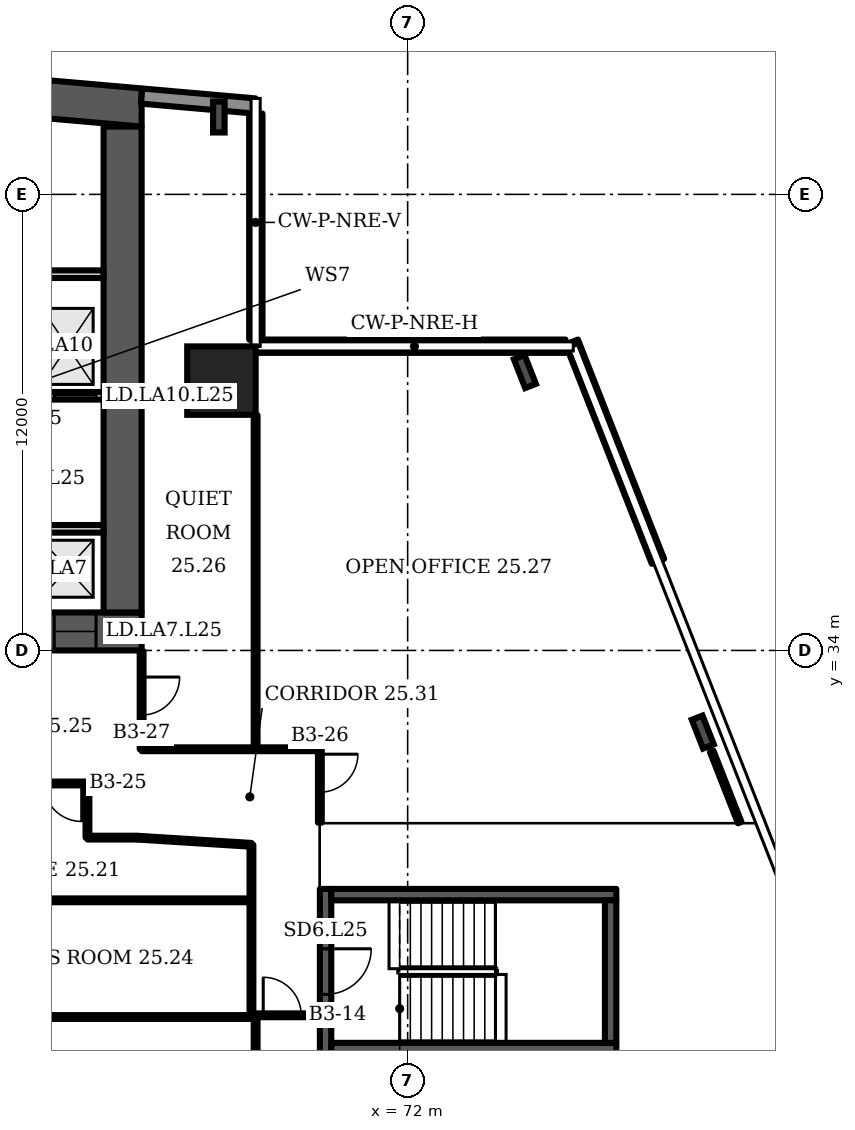
"""IFC4 building model, lengths in metres.
Left out: names, types, materials, properties, quantities, classifications, styles, units other than length and angle.
Written with IfcOpenShell. Run it as: python <this file> out.ifc"""

import sys

from ifc_helpers import new_model, si_unit, direction, frame, frame_2d, origin, origin_2d, place, context, subcontext, project, spatial, polyline, rectangle, i_section, outline, extrude, element, fill, save


model = new_model("IFC4")
c1 = context("Model", 3, precision=1e-05, world=origin(), true_north=direction((0.0, 1.0)))
c2 = subcontext(c1, "Body", "Model", "MODEL_VIEW")
j1 = project(units=[si_unit("LENGTHUNIT", "METRE"), si_unit("PLANEANGLEUNIT", "RADIAN")], contexts=[c1])
p1 = place(None, origin())
s1 = spatial("IfcSite", under=j1, at=p1, CompositionType="ELEMENT")
p2 = place(p1, origin())
s2 = spatial("IfcBuilding", under=s1, at=p2, CompositionType="ELEMENT")
p3 = place(p2, frame((0.0, 0.0, 111.1)))
s3 = spatial("IfcBuildingStorey", under=s2, at=p3, CompositionType="ELEMENT", Elevation=111.1)
p4 = place(p3, frame((0.0, 0.0, -0.0)))
e1 = element("IfcWall", 1, at=p4, inside=s3, PredefinedType="SHEAR", context=c2, shape_type="SweptSolid", body=[
    extrude(outline(polyline([(16.0, 47.784), (40.5, 49.927), (65.0, 47.784), (65.0, 48.787), (40.5, 50.931), (16.0, 48.787), (16.0, 47.784)])), origin(), (0.0, 0.0, 1.0), 3.6),
])
p5 = place(p3, frame((16.0, 34.5, 0.0), z_axis=(0.0, 0.0, 1.0), x_axis=(1.0, 0.0, 0.0)))
e2 = element("IfcWall", 2, at=p5, inside=s3, PredefinedType="SHEAR", context=c2, shape_type="SweptSolid", body=[
    extrude(rectangle(XDim=49.0, YDim=1.0, at=frame_2d((24.5, 0.0))), origin(), (0.0, 0.0, 1.0), 3.6),
])
p6 = place(p5, frame((1.2, 0.0, 0.0)))
e3 = element("IfcOpeningElement", 3, at=p6, cuts=e2, PredefinedType="OPENING", context=c2, shape_type="SweptSolid", body=[
    extrude(rectangle(XDim=1.1, YDim=2.1, at=frame_2d((0.55, 1.05))), frame((0.0, 0.51, 0.0), z_axis=(0.0, -1.0, 0.0), x_axis=(1.0, 0.0, 0.0)), (0.0, 0.0, 1.0), 1.02),
])
p7 = place(p5, frame((5.083, 0.0, 0.0)))
e4 = element("IfcOpeningElement", 4, at=p7, cuts=e2, PredefinedType="OPENING", context=c2, shape_type="SweptSolid", body=[
    extrude(rectangle(XDim=1.1, YDim=2.1, at=frame_2d((0.55, 1.05))), frame((0.0, 0.51, 0.0), z_axis=(0.0, -1.0, 0.0), x_axis=(1.0, 0.0, 0.0)), (0.0, 0.0, 1.0), 1.02),
])
p8 = place(p5, frame((2.933, 0.0, 0.0)))
e5 = element("IfcOpeningElement", 5, at=p8, cuts=e2, PredefinedType="OPENING", context=c2, shape_type="SweptSolid", body=[
    extrude(rectangle(XDim=1.4, YDim=2.1, at=frame_2d((0.7, 1.05))), frame((0.0, 0.51, 0.0), z_axis=(0.0, -1.0, 0.0), x_axis=(1.0, 0.0, 0.0)), (0.0, 0.0, 1.0), 1.02),
])
p9 = place(p5, frame((7.65, 0.0, 0.0)))
e6 = element("IfcOpeningElement", 6, at=p9, cuts=e2, PredefinedType="OPENING", context=c2, shape_type="SweptSolid", body=[
    extrude(rectangle(XDim=1.2, YDim=2.1, at=frame_2d((0.6, 1.05))), frame((0.0, 0.51, 0.0), z_axis=(0.0, -1.0, 0.0), x_axis=(1.0, 0.0, 0.0)), (0.0, 0.0, 1.0), 1.02),
])
p10 = place(p5, frame((14.817, 0.0, 0.0)))
e7 = element("IfcOpeningElement", 7, at=p10, cuts=e2, PredefinedType="OPENING", context=c2, shape_type="SweptSolid", body=[
    extrude(rectangle(XDim=1.1, YDim=2.1, at=frame_2d((0.55, 1.05))), frame((0.0, 0.51, 0.0), z_axis=(0.0, -1.0, 0.0), x_axis=(1.0, 0.0, 0.0)), (0.0, 0.0, 1.0), 1.02),
])
p11 = place(p5, frame((19.083, 0.0, 0.0)))
e8 = element("IfcOpeningElement", 8, at=p11, cuts=e2, PredefinedType="OPENING", context=c2, shape_type="SweptSolid", body=[
    extrude(rectangle(XDim=1.1, YDim=2.1, at=frame_2d((0.55, 1.05))), frame((0.0, 0.51, 0.0), z_axis=(0.0, -1.0, 0.0), x_axis=(1.0, 0.0, 0.0)), (0.0, 0.0, 1.0), 1.02),
])
p12 = place(p5, frame((16.8, 0.0, 0.0)))
e9 = element("IfcOpeningElement", 9, at=p12, cuts=e2, PredefinedType="OPENING", context=c2, shape_type="SweptSolid", body=[
    extrude(rectangle(XDim=1.4, YDim=2.1, at=frame_2d((0.7, 1.05))), frame((0.0, 0.51, 0.0), z_axis=(0.0, -1.0, 0.0), x_axis=(1.0, 0.0, 0.0)), (0.0, 0.0, 1.0), 1.02),
])
p13 = place(p5, frame((21.817, 0.0, 0.0)))
e10 = element("IfcOpeningElement", 10, at=p13, cuts=e2, PredefinedType="OPENING", context=c2, shape_type="SweptSolid", body=[
    extrude(rectangle(XDim=1.1, YDim=2.1, at=frame_2d((0.55, 1.05))), frame((0.0, 0.51, 0.0), z_axis=(0.0, -1.0, 0.0), x_axis=(1.0, 0.0, 0.0)), (0.0, 0.0, 1.0), 1.02),
])
p14 = place(p5, frame((26.083, 0.0, 0.0)))
e11 = element("IfcOpeningElement", 11, at=p14, cuts=e2, PredefinedType="OPENING", context=c2, shape_type="SweptSolid", body=[
    extrude(rectangle(XDim=1.1, YDim=2.1, at=frame_2d((0.55, 1.05))), frame((0.0, 0.51, 0.0), z_axis=(0.0, -1.0, 0.0), x_axis=(1.0, 0.0, 0.0)), (0.0, 0.0, 1.0), 1.02),
])
p15 = place(p5, frame((33.15, 0.0, 0.0)))
e12 = element("IfcOpeningElement", 12, at=p15, cuts=e2, PredefinedType="OPENING", context=c2, shape_type="SweptSolid", body=[
    extrude(rectangle(XDim=1.2, YDim=2.1, at=frame_2d((0.6, 1.05))), frame((0.0, 0.51, 0.0), z_axis=(0.0, -1.0, 0.0), x_axis=(1.0, 0.0, 0.0)), (0.0, 0.0, 1.0), 1.02),
])
p16 = place(p5, frame((37.8, 0.0, 0.0)))
e13 = element("IfcOpeningElement", 13, at=p16, cuts=e2, PredefinedType="OPENING", context=c2, shape_type="SweptSolid", body=[
    extrude(rectangle(XDim=1.4, YDim=2.1, at=frame_2d((0.7, 1.05))), frame((0.0, 0.51, 0.0), z_axis=(0.0, -1.0, 0.0), x_axis=(1.0, 0.0, 0.0)), (0.0, 0.0, 1.0), 1.02),
])
p17 = place(p5, frame((42.817, 0.0, 0.0)))
e14 = element("IfcOpeningElement", 14, at=p17, cuts=e2, PredefinedType="OPENING", context=c2, shape_type="SweptSolid", body=[
    extrude(rectangle(XDim=1.1, YDim=2.1, at=frame_2d((0.55, 1.05))), frame((0.0, 0.51, 0.0), z_axis=(0.0, -1.0, 0.0), x_axis=(1.0, 0.0, 0.0)), (0.0, 0.0, 1.0), 1.02),
])
p18 = place(p5, frame((46.7, 0.0, 0.0)))
e15 = element("IfcOpeningElement", 15, at=p18, cuts=e2, PredefinedType="OPENING", context=c2, shape_type="SweptSolid", body=[
    extrude(rectangle(XDim=1.1, YDim=2.1, at=frame_2d((0.55, 1.05))), frame((0.0, 0.51, 0.0), z_axis=(0.0, -1.0, 0.0), x_axis=(1.0, 0.0, 0.0)), (0.0, 0.0, 1.0), 1.02),
])
p19 = place(p5, frame((44.667, 0.0, 0.0)))
e16 = element("IfcOpeningElement", 16, at=p19, cuts=e2, PredefinedType="OPENING", context=c2, shape_type="SweptSolid", body=[
    extrude(rectangle(XDim=1.4, YDim=2.1, at=frame_2d((0.7, 1.05))), frame((0.0, 0.51, 0.0), z_axis=(0.0, -1.0, 0.0), x_axis=(1.0, 0.0, 0.0)), (0.0, 0.0, 1.0), 1.02),
])
p20 = place(p3, frame((64.5, 35.0, 0.0), z_axis=(0.0, 0.0, 1.0), x_axis=(0.0, 1.0, 0.0)))
e17 = element("IfcWall", 17, at=p20, inside=s3, PredefinedType="SHEAR", context=c2, shape_type="SweptSolid", body=[
    extrude(rectangle(XDim=12.784, YDim=1.0, at=frame_2d((6.392, 0.0))), origin(), (0.0, 0.0, 1.0), 3.6),
])
p21 = place(p3, frame((67.1, 41.1, 0.0), z_axis=(0.0, 0.0, 1.0), x_axis=(1.0, 0.0, 0.0)))
e18 = element("IfcColumn", 18, at=p21, inside=s3, PredefinedType="COLUMN", context=c2, shape_type="SweptSolid", body=[
    extrude(rectangle(XDim=1.8, YDim=1.8, at=origin_2d()), origin(), (0.0, 0.0, 1.0), 3.6),
])
for number, where, z_axis, x_axis in (
    (19, (79.766, 31.853, 0.0), (0.0, 0.0, 1.0), (0.931, 0.366, 0.0)),
    (20, (75.085, 41.338, 0.0), (0.0, 0.0, 1.0), (0.931, 0.366, 0.0)),
    (21, (67.032, 48.036, 0.0), (0.0, 0.0, 1.0), (1.0, 0.0, 0.0)),
):
    element("IfcColumn", number, at=place(p3, frame(where, z_axis=z_axis, x_axis=x_axis)), inside=s3, PredefinedType="COLUMN", context=c2, shape_type="SweptSolid", body=[
        extrude(i_section(OverallWidth=0.303, OverallDepth=0.814, WebThickness=0.021, FlangeThickness=0.04, FilletRadius=0.03, at=origin_2d()), origin(), (0.0, 0.0, 1.0), 3.6),
    ])
p22 = place(p3, frame((67.983, 48.326, 0.0), z_axis=(0.0, 0.0, 1.0), x_axis=(-0.996194, 0.087168, 0.0)))
e22 = element("IfcWall", 22, at=p22, inside=s3, PredefinedType="SOLIDWALL", context=c2, shape_type="SweptSolid", body=[
    extrude(rectangle(XDim=2.994, YDim=0.4, at=frame_2d((1.497, 0.0))), origin(), (0.0, 0.0, 1.0), 3.2),
])
p23 = place(p3, frame((78.586, 36.344, 0.0), z_axis=(0.0, 0.0, 1.0), x_axis=(-0.365792, 0.930699, 0.0)))
e23 = element("IfcWall", 23, at=p23, inside=s3, PredefinedType="SOLIDWALL", context=c2, shape_type="SweptSolid", body=[
    extrude(rectangle(XDim=6.202, YDim=0.35, at=frame_2d((3.101, 0.0))), origin(), (0.0, 0.0, 1.0), 1.0),
])
p24 = place(p3, frame((76.155, 42.005, 0.0), z_axis=(0.0, 0.0, 1.0), x_axis=(-1.0, 0.0, 0.0)))
e24 = element("IfcWall", 24, at=p24, inside=s3, PredefinedType="SOLIDWALL", context=c2, shape_type="SweptSolid", body=[
    extrude(rectangle(XDim=8.155, YDim=0.35, at=frame_2d((4.078, 0.0))), origin(), (0.0, 0.0, 1.0), 1.0),
])
p25 = place(p3, frame((68.005, 42.18, 0.0), z_axis=(0.0, 0.0, 1.0), x_axis=(0.0, 1.0, 0.0)))
e25 = element("IfcWall", 25, at=p25, inside=s3, PredefinedType="SOLIDWALL", context=c2, shape_type="SweptSolid", body=[
    extrude(rectangle(XDim=5.947, YDim=0.35, at=frame_2d((2.973, 0.0))), origin(), (0.0, 0.0, 1.0), 1.0),
])
p26 = place(p3, frame((58.5, 40.7, 0.0), z_axis=(0.0, 0.0, 1.0), x_axis=(1.0, 0.0, 0.0)))
e26 = element("IfcWall", 26, at=p26, inside=s3, PredefinedType="PARTITIONING", context=c2, shape_type="SweptSolid", body=[
    extrude(rectangle(XDim=5.5, YDim=0.2, at=frame_2d((2.75, 0.0))), origin(), (0.0, 0.0, 1.0), 3.2),
])
p27 = place(p26, frame((0.317, 0.0, 0.0)))
e27 = element("IfcOpeningElement", 27, at=p27, cuts=e26, PredefinedType="OPENING", context=c2, shape_type="SweptSolid", body=[
    extrude(rectangle(XDim=1.1, YDim=2.1, at=frame_2d((0.55, 1.05))), frame((0.0, 0.11, 0.0), z_axis=(0.0, -1.0, 0.0), x_axis=(1.0, 0.0, 0.0)), (0.0, 0.0, 1.0), 0.22),
])
p28 = place(p26, frame((2.317, 0.0, 0.0)))
e28 = element("IfcOpeningElement", 28, at=p28, cuts=e26, PredefinedType="OPENING", context=c2, shape_type="SweptSolid", body=[
    extrude(rectangle(XDim=1.1, YDim=2.1, at=frame_2d((0.55, 1.05))), frame((0.0, 0.11, 0.0), z_axis=(0.0, -1.0, 0.0), x_axis=(1.0, 0.0, 0.0)), (0.0, 0.0, 1.0), 0.22),
])
p29 = place(p26, frame((4.2, 0.0, 0.0)))
e29 = element("IfcOpeningElement", 29, at=p29, cuts=e26, PredefinedType="OPENING", context=c2, shape_type="SweptSolid", body=[
    extrude(rectangle(XDim=1.1, YDim=2.1, at=frame_2d((0.55, 1.05))), frame((0.0, 0.11, 0.0), z_axis=(0.0, -1.0, 0.0), x_axis=(1.0, 0.0, 0.0)), (0.0, 0.0, 1.0), 0.22),
])
p30 = place(p3, frame((0.0, 0.0, -0.0)))
e30 = element("IfcWall", 30, at=p30, inside=s3, PredefinedType="PARTITIONING", context=c2, shape_type="SweptSolid", body=[
    extrude(outline(polyline([(62.3, 37.3), (62.5, 37.3), (64.0, 37.3), (64.0, 37.1), (62.5, 37.1), (62.5, 35.0), (62.3, 35.0), (62.3, 37.3)])), origin(), (0.0, 0.0, 1.0), 3.2),
])
p31 = place(p3, frame((0.0, 0.0, -0.0)))
e31 = element("IfcWall", 31, at=p31, inside=s3, PredefinedType="PARTITIONING", context=c2, shape_type="SweptSolid", body=[
    extrude(outline(polyline([(60.433, 40.8), (60.233, 40.8), (60.233, 43.8), (58.5, 43.8), (58.5, 44.0), (64.0, 44.0), (64.0, 43.8), (62.5, 43.8), (62.5, 40.8), (62.3, 40.8), (62.3, 43.8), (60.433, 43.8), (60.433, 40.8)])), origin(), (0.0, 0.0, 1.0), 3.2),
])
p32 = place(p3, frame((69.84, 23.375, 0.0), z_axis=(0.0, 0.0, 1.0), x_axis=(0.0, 1.0, 0.0)))
e32 = element("IfcWall", 32, at=p32, inside=s3, PredefinedType="SHEAR", context=c2, shape_type="SweptSolid", body=[
    extrude(rectangle(XDim=4.35, YDim=0.3, at=frame_2d((2.175, 0.0))), origin(), (0.0, 0.0, 1.0), 3.2),
])
p33 = place(p32, frame((1.575, 0.0, 0.0)))
e33 = element("IfcOpeningElement", 33, at=p33, cuts=e32, PredefinedType="OPENING", context=c2, shape_type="SweptSolid", body=[
    extrude(rectangle(XDim=1.2, YDim=2.1, at=frame_2d((0.6, 1.05))), frame((0.0, 0.16, 0.0), z_axis=(0.0, -1.0, 0.0), x_axis=(1.0, 0.0, 0.0)), (0.0, 0.0, 1.0), 0.32),
])
p34 = place(p3, frame((59.4, 24.355, 0.0), z_axis=(0.0, 0.0, 1.0), x_axis=(1.0, 0.0, 0.0)))
e34 = element("IfcWall", 34, at=p34, inside=s3, PredefinedType="PARTITIONING", context=c2, shape_type="SweptSolid", body=[
    extrude(rectangle(XDim=8.6, YDim=0.1, at=frame_2d((4.3, 0.0))), origin(), (0.0, 0.0, 1.0), 3.2),
])
p35 = place(p3, frame((59.4, 27.425, 0.0), z_axis=(0.0, 0.0, 1.0), x_axis=(1.0, 0.0, 0.0)))
e35 = element("IfcWall", 35, at=p35, inside=s3, PredefinedType="PARTITIONING", context=c2, shape_type="SweptSolid", body=[
    extrude(rectangle(XDim=8.49, YDim=0.1, at=frame_2d((4.245, 0.0))), origin(), (0.0, 0.0, 1.0), 3.2),
])
p36 = place(p3, frame((59.4, 30.5, 0.0), z_axis=(0.0, 0.0, 1.0), x_axis=(1.0, 0.0, 0.0)))
e36 = element("IfcWall", 36, at=p36, inside=s3, PredefinedType="PARTITIONING", context=c2, shape_type="SweptSolid", body=[
    extrude(rectangle(XDim=4.175, YDim=0.1, at=frame_2d((2.087, 0.0))), origin(), (0.0, 0.0, 1.0), 3.2),
])
p37 = place(p36, frame((3.025, 0.0, 0.0)))
e37 = element("IfcOpeningElement", 37, at=p37, cuts=e36, PredefinedType="OPENING", context=c2, shape_type="SweptSolid", body=[
    extrude(rectangle(XDim=1.0, YDim=2.1, at=frame_2d((0.5, 1.05))), frame((0.0, 0.06, 0.0), z_axis=(0.0, -1.0, 0.0), x_axis=(1.0, 0.0, 0.0)), (0.0, 0.0, 1.0), 0.12),
])
p38 = place(p3, frame((63.575, 29.075, 0.0), z_axis=(0.0, 0.0, 1.0), x_axis=(0.0, 1.0, 0.0)))
e38 = element("IfcWall", 38, at=p38, inside=s3, PredefinedType="PARTITIONING", context=c2, shape_type="SweptSolid", body=[
    extrude(rectangle(XDim=1.425, YDim=0.1, at=frame_2d((0.712, 0.0))), origin(), (0.0, 0.0, 1.0), 3.2),
])
p39 = place(p3, frame((63.575, 29.075, 0.0), z_axis=(0.0, 0.0, 1.0), x_axis=(1.0, 0.0, 0.0)))
e39 = element("IfcWall", 39, at=p39, inside=s3, PredefinedType="PARTITIONING", context=c2, shape_type="SweptSolid", body=[
    extrude(rectangle(XDim=1.285, YDim=0.1, at=frame_2d((0.643, 0.0))), origin(), (0.0, 0.0, 1.0), 3.2),
])
p40 = place(p3, frame((65.0, 31.4, 0.0), z_axis=(0.0, 0.0, 1.0), x_axis=(0.0, 1.0, 0.0)))
e40 = element("IfcWall", 40, at=p40, inside=s3, PredefinedType="PARTITIONING", context=c2, shape_type="SweptSolid", body=[
    extrude(rectangle(XDim=2.58, YDim=0.1, at=frame_2d((1.29, 0.0))), origin(), (0.0, 0.0, 1.0), 3.2),
])
p41 = place(p40, frame((0.9, 0.0, 0.0)))
e41 = element("IfcOpeningElement", 41, at=p41, cuts=e40, PredefinedType="OPENING", context=c2, shape_type="SweptSolid", body=[
    extrude(rectangle(XDim=1.0, YDim=2.1, at=frame_2d((0.5, 1.05))), frame((0.0, 0.06, 0.0), z_axis=(0.0, -1.0, 0.0), x_axis=(1.0, 0.0, 0.0)), (0.0, 0.0, 1.0), 0.12),
])
p42 = place(p3, frame((65.0, 31.4, 0.0), z_axis=(0.0, 0.0, 1.0), x_axis=(1.0, 0.0, 0.0)))
e42 = element("IfcWall", 42, at=p42, inside=s3, PredefinedType="PARTITIONING", context=c2, shape_type="SweptSolid", body=[
    extrude(rectangle(XDim=4.69, YDim=0.1, at=frame_2d((2.345, 0.0))), origin(), (0.0, 0.0, 1.0), 3.2),
])
p43 = place(p3, frame((67.89, 24.4, 0.0), z_axis=(0.0, 0.0, 1.0), x_axis=(0.0, 1.0, 0.0)))
e43 = element("IfcWall", 43, at=p43, inside=s3, PredefinedType="PARTITIONING", context=c2, shape_type="SweptSolid", body=[
    extrude(rectangle(XDim=4.485, YDim=0.1, at=frame_2d((2.243, 0.0))), origin(), (0.0, 0.0, 1.0), 3.2),
])
p44 = place(p3, frame((68.0, 24.4, 0.0), z_axis=(0.0, 0.0, 1.0), x_axis=(1.0, 0.0, 0.0)))
e44 = element("IfcWall", 44, at=p44, inside=s3, PredefinedType="PARTITIONING", context=c2, shape_type="SweptSolid", body=[
    extrude(rectangle(XDim=1.67, YDim=0.1, at=frame_2d((0.835, 0.0))), origin(), (0.0, 0.0, 1.0), 3.2),
])
p45 = place(p44, frame((0.2, 0.0, 0.0)))
e45 = element("IfcOpeningElement", 45, at=p45, cuts=e44, PredefinedType="OPENING", context=c2, shape_type="SweptSolid", body=[
    extrude(rectangle(XDim=1.0, YDim=2.1, at=frame_2d((0.5, 1.05))), frame((0.0, 0.06, 0.0), z_axis=(0.0, -1.0, 0.0), x_axis=(1.0, 0.0, 0.0)), (0.0, 0.0, 1.0), 0.12),
])
p46 = place(p3, frame((67.89, 28.885, 0.0), z_axis=(0.0, 0.0, 1.0), x_axis=(-0.998031, 0.062786, 0.0)))
e46 = element("IfcWall", 46, at=p46, inside=s3, PredefinedType="PARTITIONING", context=c2, shape_type="SweptSolid", body=[
    extrude(rectangle(XDim=3.021, YDim=0.1, at=frame_2d((1.511, 0.0))), origin(), (0.0, 0.0, 1.0), 3.2),
])
p47 = place(p3, frame((68.0, 15.13, 0.0), z_axis=(0.0, 0.0, 1.0), x_axis=(0.0, 1.0, 0.0)))
e47 = element("IfcWall", 47, at=p47, inside=s3, PredefinedType="PARTITIONING", context=c2, shape_type="SweptSolid", body=[
    extrude(rectangle(XDim=9.22, YDim=0.1, at=frame_2d((4.61, 0.0))), origin(), (0.0, 0.0, 1.0), 3.2),
])
p48 = place(p3, frame((68.0, 31.4, 0.0), z_axis=(0.0, 0.0, 1.0), x_axis=(0.0, 1.0, 0.0)))
e48 = element("IfcWall", 48, at=p48, inside=s3, PredefinedType="PARTITIONING", context=c2, shape_type="SweptSolid", body=[
    extrude(rectangle(XDim=8.79, YDim=0.1, at=frame_2d((4.395, 0.0))), origin(), (0.0, 0.0, 1.0), 3.2),
])
p49 = place(p3, frame((69.69, 29.47, 0.0), z_axis=(0.0, 0.0, 1.0), x_axis=(0.0, 1.0, 0.0)))
e49 = element("IfcWall", 49, at=p49, inside=s3, PredefinedType="PARTITIONING", context=c2, shape_type="SweptSolid", body=[
    extrude(rectangle(XDim=1.93, YDim=0.1, at=frame_2d((0.965, 0.0))), origin(), (0.0, 0.0, 1.0), 3.2),
])
p50 = place(p49, frame((0.8, 0.0, 0.0)))
e50 = element("IfcOpeningElement", 50, at=p50, cuts=e49, PredefinedType="OPENING", context=c2, shape_type="SweptSolid", body=[
    extrude(rectangle(XDim=1.0, YDim=2.1, at=frame_2d((0.5, 1.05))), frame((0.0, 0.06, 0.0), z_axis=(0.0, -1.0, 0.0), x_axis=(1.0, 0.0, 0.0)), (0.0, 0.0, 1.0), 0.12),
])
p51 = place(p3, frame((80.737, 29.47, 0.0), z_axis=(0.0, 0.0, 1.0), x_axis=(-0.365847, 0.930674, 0.0)))
e51 = element("IfcWall", 51, at=p51, inside=s3, PredefinedType="PARTITIONING", context=c2, shape_type="SweptSolid", body=[
    extrude(rectangle(XDim=2.015, YDim=0.1, at=frame_2d((1.007, 0.0))), origin(), (0.0, 0.0, 1.0), 2.58),
])
for number, where, z_axis, x_axis in (
    (52, (69.99, 23.525, 0.0), (0.0, 0.0, 1.0), (1.0, 0.0, 0.0)),
    (53, (69.99, 27.575, 0.0), (0.0, 0.0, 1.0), (1.0, 0.0, 0.0)),
):
    element("IfcWall", number, at=place(p3, frame(where, z_axis=z_axis, x_axis=x_axis)), inside=s3, PredefinedType="SHEAR", context=c2, shape_type="SweptSolid", body=[
        extrude(rectangle(XDim=7.5, YDim=0.3, at=frame_2d((3.75, 0.0))), origin(), (0.0, 0.0, 1.0), 3.2),
    ])
p52 = place(p3, frame((77.34, 23.675, 0.0), z_axis=(0.0, 0.0, 1.0), x_axis=(0.0, 1.0, 0.0)))
e54 = element("IfcWall", 54, at=p52, inside=s3, PredefinedType="SHEAR", context=c2, shape_type="SweptSolid", body=[
    extrude(rectangle(XDim=3.75, YDim=0.3, at=frame_2d((1.875, 0.0))), origin(), (0.0, 0.0, 1.0), 3.2),
])
p53 = place(p18, origin())
e55 = element("IfcDoor", 55, at=p53, inside=s3, OperationType="DOUBLE_DOOR_SLIDING", PredefinedType="DOOR", context=c2, shape_type="SweptSolid", body=[
    extrude(rectangle(XDim=1.1, YDim=2.1, at=frame_2d((0.55, 1.05))), frame((0.0, 0.025, 0.0), z_axis=(0.0, -1.0, 0.0), x_axis=(1.0, 0.0, 0.0)), (0.0, 0.0, 1.0), 0.05),
])
fill(e15, e55)
p54 = place(p29, origin())
e56 = element("IfcDoor", 56, at=p54, inside=s3, OperationType="DOUBLE_DOOR_SLIDING", PredefinedType="DOOR", context=c2, shape_type="SweptSolid", body=[
    extrude(rectangle(XDim=1.1, YDim=2.1, at=frame_2d((0.55, 1.05))), frame((0.0, 0.025, 0.0), z_axis=(0.0, -1.0, 0.0), x_axis=(1.0, 0.0, 0.0)), (0.0, 0.0, 1.0), 0.05),
])
fill(e29, e56)
p55 = place(p33, origin())
e57 = element("IfcDoor", 57, at=p55, inside=s3, OperationType="SINGLE_SWING_RIGHT", PredefinedType="DOOR", context=c2, shape_type="SweptSolid", body=[
    extrude(rectangle(XDim=1.2, YDim=2.1, at=frame_2d((0.6, 1.05))), frame((0.0, 0.025, 0.0), z_axis=(0.0, -1.0, 0.0), x_axis=(1.0, 0.0, 0.0)), (0.0, 0.0, 1.0), 0.05),
])
fill(e33, e57)
p56 = place(p45, origin())
e58 = element("IfcDoor", 58, at=p56, inside=s3, OperationType="SINGLE_SWING_LEFT", PredefinedType="DOOR", context=c2, shape_type="SweptSolid", body=[
    extrude(rectangle(XDim=1.0, YDim=2.1, at=frame_2d((0.5, 1.05))), frame((0.0, 0.025, 0.0), z_axis=(0.0, -1.0, 0.0), x_axis=(1.0, 0.0, 0.0)), (0.0, 0.0, 1.0), 0.05),
])
fill(e45, e58)
p57 = place(p37, origin())
e59 = element("IfcDoor", 59, at=p57, inside=s3, OperationType="SINGLE_SWING_RIGHT", PredefinedType="DOOR", context=c2, shape_type="SweptSolid", body=[
    extrude(rectangle(XDim=1.0, YDim=2.1, at=frame_2d((0.5, 1.05))), frame((0.0, 0.025, 0.0), z_axis=(0.0, -1.0, 0.0), x_axis=(1.0, 0.0, 0.0)), (0.0, 0.0, 1.0), 0.05),
])
fill(e37, e59)
p58 = place(p50, origin())
e60 = element("IfcDoor", 60, at=p58, inside=s3, OperationType="SINGLE_SWING_RIGHT", PredefinedType="DOOR", context=c2, shape_type="SweptSolid", body=[
    extrude(rectangle(XDim=1.0, YDim=2.1, at=frame_2d((0.5, 1.05))), frame((0.0, 0.025, 0.0), z_axis=(0.0, -1.0, 0.0), x_axis=(1.0, 0.0, 0.0)), (0.0, 0.0, 1.0), 0.05),
])
fill(e50, e60)
p59 = place(p41, origin())
e61 = element("IfcDoor", 61, at=p59, inside=s3, OperationType="SINGLE_SWING_RIGHT", PredefinedType="DOOR", context=c2, shape_type="SweptSolid", body=[
    extrude(rectangle(XDim=1.0, YDim=2.1, at=frame_2d((0.5, 1.05))), frame((0.0, 0.025, 0.0), z_axis=(0.0, -1.0, 0.0), x_axis=(1.0, 0.0, 0.0)), (0.0, 0.0, 1.0), 0.05),
])
fill(e41, e61)
save(model, sys.argv[1])
